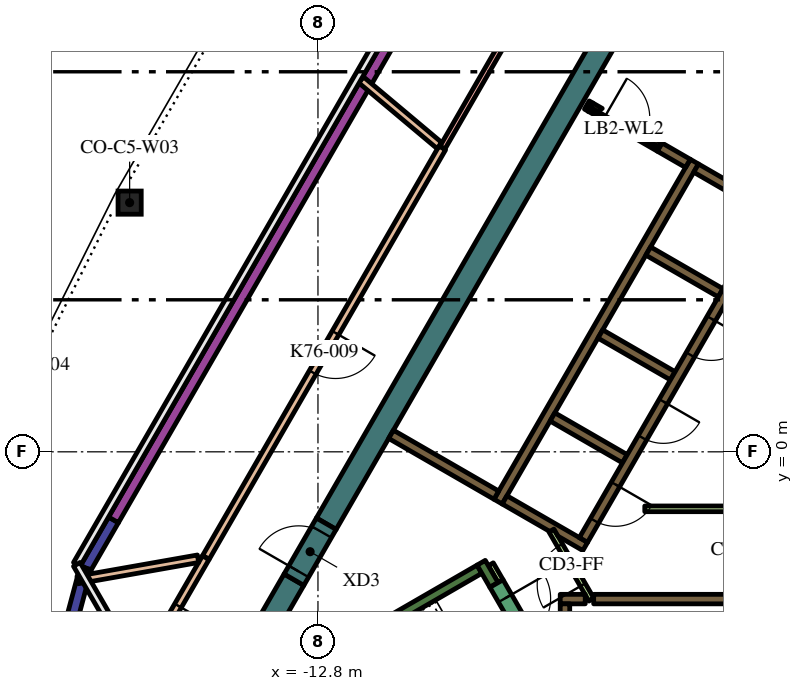
"""IFC4 building model, lengths in metres.
Left out: names, types, materials, properties, quantities, classifications, styles, units other than length and angle.
Written with IfcOpenShell. Run it as: python <this file> out.ifc"""

import sys

from ifc_helpers import new_model, si_unit, direction, frame, frame_2d, origin, origin_2d, place, context, subcontext, project, spatial, polyline, rectangle, hollow_circle, outline, extrude, element, fill, save


model = new_model("IFC4")
c1 = context("Model", 3, precision=1e-05, world=origin(), true_north=direction((0.0, 1.0)))
c2 = subcontext(c1, "Body", "Model", "MODEL_VIEW")
j1 = project(units=[si_unit("LENGTHUNIT", "METRE"), si_unit("PLANEANGLEUNIT", "RADIAN")], contexts=[c1])
p1 = place(None, origin())
s1 = spatial("IfcSite", under=j1, at=p1, CompositionType="ELEMENT")
p2 = place(p1, origin())
s2 = spatial("IfcBuilding", under=s1, at=p2, CompositionType="ELEMENT")
p3 = place(p2, frame((0.0, 0.0, 327.6)))
s3 = spatial("IfcBuildingStorey", under=s2, at=p3, CompositionType="ELEMENT", Elevation=327.6)
p4 = place(p3, frame((-17.756, 6.557, 0.0), z_axis=(0.0, 0.0, 1.0), x_axis=(1.0, 0.0, 0.0)))
e1 = element("IfcColumn", 1, at=p4, inside=s3, PredefinedType="COLUMN", context=c2, shape_type="SweptSolid", body=[
    extrude(hollow_circle(Radius=0.305, WallThickness=0.025, at=origin_2d()), origin(), (0.0, 0.0, 1.0), 4.2),
])
p5 = place(p3, frame((-13.432, -3.364, 0.0), z_axis=(0.0, 0.0, 1.0), x_axis=(-0.499960127962, -0.866048422692, 0.0)))
e2 = element("IfcWall", 2, at=p5, inside=s3, PredefinedType="SOLIDWALL", context=c2, shape_type="SweptSolid", body=[
    extrude(rectangle(XDim=2.934, YDim=0.6, at=frame_2d((1.467, 0.0))), origin(), (0.0, 0.0, 1.0), 4.2),
])
p6 = place(p3, frame((-4.652, 11.842, 0.0), z_axis=(0.0, 0.0, 1.0), x_axis=(-0.500003640647, -0.866023301845, 0.0)))
e3 = element("IfcWall", 3, at=p6, inside=s3, PredefinedType="SOLIDWALL", context=c2, shape_type="SweptSolid", body=[
    extrude(rectangle(XDim=15.858, YDim=0.6, at=frame_2d((7.929, 0.0))), origin(), (0.0, 0.0, 1.0), 4.2),
])
p7 = place(p3, frame((-14.44, -6.49, 0.0), z_axis=(0.0, 0.0, 1.0), x_axis=(0.866022966069, 0.500004222222, 0.0)))
e4 = element("IfcWall", 4, at=p7, inside=s3, PredefinedType="SOLIDWALL", context=c2, shape_type="SweptSolid", body=[
    extrude(rectangle(XDim=6.8, YDim=0.25, at=frame_2d((3.4, 0.0))), origin(), (0.0, 0.0, 1.0), 4.2),
])
p8 = place(p3, frame((-8.168, -3.503, 0.0), z_axis=(0.0, 0.0, 1.0), x_axis=(-0.499952099219, 0.866053057547, 0.0)))
e5 = element("IfcWall", 5, at=p8, inside=s3, PredefinedType="SOLIDWALL", context=c2, shape_type="SweptSolid", body=[
    extrude(rectangle(XDim=0.675, YDim=0.25, at=frame_2d((0.337, 0.0))), origin(), (0.0, 0.0, 1.0), 4.2),
])
p9 = place(p3, frame((-5.545, -3.875, 0.0), z_axis=(0.0, 0.0, 1.0), x_axis=(1.0, 0.0, 0.0)))
e6 = element("IfcWall", 6, at=p9, inside=s3, PredefinedType="SOLIDWALL", context=c2, shape_type="SweptSolid", body=[
    extrude(rectangle(XDim=11.97, YDim=0.25, at=frame_2d((5.985, 0.0))), origin(), (0.0, 0.0, 1.0), 4.2),
])
p10 = place(p3, frame((-6.425, -3.875, 0.0), z_axis=(0.0, 0.0, 1.0), x_axis=(1.0, 0.0, 0.0)))
e7 = element("IfcWall", 7, at=p10, inside=s3, PredefinedType="SOLIDWALL", context=c2, shape_type="SweptSolid", body=[
    extrude(rectangle(XDim=0.658, YDim=0.25, at=frame_2d((0.329, 0.0))), origin(), (0.0, 0.0, 1.0), 4.2),
])
p11 = place(p3, frame((-6.3, -7.125, 0.0), z_axis=(0.0, 0.0, 1.0), x_axis=(0.0, 1.0, 0.0)))
e8 = element("IfcWall", 8, at=p11, inside=s3, PredefinedType="SOLIDWALL", context=c2, shape_type="SweptSolid", body=[
    extrude(rectangle(XDim=3.125, YDim=0.25, at=frame_2d((1.562, 0.0))), origin(), (0.0, 0.0, 1.0), 4.2),
])
p12 = place(p3, frame((-8.06, -1.311, 0.0), z_axis=(0.0, 0.0, 1.0), x_axis=(0.50000273126, 0.866023826885, 0.0)))
e9 = element("IfcWall", 9, at=p12, inside=s3, PredefinedType="SOLIDWALL", context=c2, shape_type="SweptSolid", body=[
    extrude(rectangle(XDim=10.33, YDim=0.25, at=frame_2d((5.165, 0.0))), origin(), (0.0, 0.0, 1.0), 4.2),
])
p13 = place(p3, frame((-1.76, 6.836, 0.0), z_axis=(0.0, 0.0, 1.0), x_axis=(-0.865952863304, 0.500125622755, 0.0)))
e10 = element("IfcWall", 10, at=p13, inside=s3, PredefinedType="SOLIDWALL", context=c2, shape_type="SweptSolid", body=[
    extrude(rectangle(XDim=1.258, YDim=0.25, at=frame_2d((0.629, 0.0))), origin(), (0.0, 0.0, 1.0), 4.2),
])
for number, where, z_axis, x_axis in (
    (11, (-2.204, 4.182, 0.0), (0.0, 0.0, 1.0), (-0.866, 0.5, 0.0)),
    (12, (-5.369, 3.1, 0.0), (0.0, 0.0, 1.0), (0.866, -0.5, 0.0)),
    (13, (-4.724, -0.182, 0.0), (0.0, 0.0, 1.0), (-0.866, 0.5, 0.0)),
):
    element("IfcWall", number, at=place(p3, frame(where, z_axis=z_axis, x_axis=x_axis)), inside=s3, PredefinedType="SOLIDWALL", context=c2, shape_type="SweptSolid", body=[
        extrude(rectangle(XDim=2.2, YDim=0.25, at=frame_2d((1.1, 0.0))), origin(), (0.0, 0.0, 1.0), 4.2),
    ])
p14 = place(p3, origin())
e14 = element("IfcWall", 14, at=p14, inside=s3, PredefinedType="SOLIDWALL", context=c2, shape_type="SweptSolid", body=[
    extrude(outline(polyline([(-5.922, -2.257), (-5.922, -2.257), (-5.705, -2.382), (-5.83, -2.598), (-6.483, -2.221), (-6.591, -2.033), (-6.591, -2.033), (-6.7, -2.096), (-7.952, -1.373), (-7.827, -1.156), (-5.922, -2.257)])), origin(), (0.0, 0.0, 1.0), 4.2),
])
p15 = place(p3, frame((-8.106, -1.14, 0.0), z_axis=(0.0, 0.0, 1.0), x_axis=(-0.866008981251, 0.500028443584, 0.0)))
e15 = element("IfcWall", 15, at=p15, inside=s3, PredefinedType="SOLIDWALL", context=c2, shape_type="SweptSolid", body=[
    extrude(rectangle(XDim=3.2, YDim=0.25, at=frame_2d((1.6, 0.0))), origin(), (0.0, 0.0, 1.0), 4.2),
])
p16 = place(p3, frame((-5.725, 9.125, 0.0), z_axis=(0.0, 0.0, 1.0), x_axis=(0.866185586049, -0.49972245349, 0.0)))
e16 = element("IfcWall", 16, at=p16, inside=s3, PredefinedType="SOLIDWALL", context=c2, shape_type="SweptSolid", body=[
    extrude(rectangle(XDim=0.11, YDim=0.25, at=frame_2d((0.055, 0.0))), origin(), (0.0, 0.0, 1.0), 4.2),
])
p17 = place(p3, frame((-3.066, 7.59, 0.0), z_axis=(0.0, 0.0, 1.0), x_axis=(-0.866081358704, 0.49990307071, 0.0)))
e17 = element("IfcWall", 17, at=p17, inside=s3, PredefinedType="SOLIDWALL", context=c2, shape_type="SweptSolid", body=[
    extrude(rectangle(XDim=0.858, YDim=0.25, at=frame_2d((0.429, 0.0))), origin(), (0.0, 0.0, 1.0), 4.2),
])
e18 = element("IfcWall", 18, at=p14, inside=s3, PredefinedType="SOLIDWALL", context=c2, shape_type="SweptSolid", body=[
    extrude(outline(polyline([(-3.748, 8.128), (-3.813, 8.015), (-4.027, 8.139), (-4.017, 8.156), (-4.008, 8.173), (-4.0, 8.192), (-3.995, 8.21), (-3.991, 8.23), (-3.99, 8.25), (-3.99, 8.268), (-3.748, 8.128)])), origin(), (0.0, 0.0, 1.0), 4.2),
])
e19 = element("IfcWall", 19, at=p14, inside=s3, PredefinedType="SOLIDWALL", context=c2, shape_type="SweptSolid", body=[
    extrude(outline(polyline([(-5.689, 8.96), (-5.69, 8.961), (-5.565, 9.177), (-5.319, 9.035), (-5.335, 9.026), (-5.351, 9.015), (-5.366, 9.002), (-5.379, 8.988), (-5.392, 8.972), (-5.402, 8.956), (-5.412, 8.939), (-5.629, 9.064), (-5.629, 9.064), (-5.689, 8.96)])), origin(), (0.0, 0.0, 1.0), 4.2),
])
p18 = place(p3, frame((-8.252, -2.958, 0.0), z_axis=(0.0, 0.0, 1.0), x_axis=(0.500174715838, -0.865924508047, 0.0)))
e20 = element("IfcWall", 20, at=p18, inside=s3, PredefinedType="PARTITIONING", context=c2, shape_type="SweptSolid", body=[
    extrude(rectangle(XDim=0.514, YDim=0.15, at=frame_2d((0.257, 0.0))), origin(), (0.0, 0.0, 1.0), 3.45),
])
p19 = place(p3, frame((-4.2, -1.5, 0.0), z_axis=(0.0, 0.0, 1.0), x_axis=(1.0, 0.0, 0.0)))
e21 = element("IfcWall", 21, at=p19, inside=s3, PredefinedType="PARTITIONING", context=c2, shape_type="SweptSolid", body=[
    extrude(rectangle(XDim=9.359, YDim=0.15, at=frame_2d((4.68, 0.0))), origin(), (0.0, 0.0, 1.0), 3.45),
])
p20 = place(p3, frame((-0.898, 6.194, 0.0), z_axis=(0.0, 0.0, 1.0), x_axis=(-0.499996202215, -0.866027596426, 0.0)))
e22 = element("IfcWall", 22, at=p20, inside=s3, PredefinedType="SOLIDWALL", context=c2, shape_type="SweptSolid", body=[
    extrude(rectangle(XDim=9.83, YDim=0.25, at=frame_2d((4.915, 0.0))), origin(), (0.0, 0.0, 1.0), 4.2),
])
p21 = place(p20, frame((0.585, 0.0, 0.0)))
e23 = element("IfcOpeningElement", 23, at=p21, cuts=e22, PredefinedType="OPENING", context=c2, shape_type="SweptSolid", body=[
    extrude(rectangle(XDim=1.1, YDim=2.1, at=frame_2d((0.55, 1.05))), frame((0.0, 0.135, 0.0), z_axis=(0.0, -1.0, 0.0), x_axis=(1.0, 0.0, 0.0)), (0.0, 0.0, 1.0), 0.27),
])
p22 = place(p20, frame((3.105, 0.0, 0.0)))
e24 = element("IfcOpeningElement", 24, at=p22, cuts=e22, PredefinedType="OPENING", context=c2, shape_type="SweptSolid", body=[
    extrude(rectangle(XDim=1.1, YDim=2.1, at=frame_2d((0.55, 1.05))), frame((0.0, 0.135, 0.0), z_axis=(0.0, -1.0, 0.0), x_axis=(1.0, 0.0, 0.0)), (0.0, 0.0, 1.0), 0.27),
])
p23 = place(p20, frame((5.625, 0.0, 0.0)))
e25 = element("IfcOpeningElement", 25, at=p23, cuts=e22, PredefinedType="OPENING", context=c2, shape_type="SweptSolid", body=[
    extrude(rectangle(XDim=1.1, YDim=2.1, at=frame_2d((0.55, 1.05))), frame((0.0, 0.135, 0.0), z_axis=(0.0, -1.0, 0.0), x_axis=(1.0, 0.0, 0.0)), (0.0, 0.0, 1.0), 0.27),
])
p24 = place(p20, frame((8.145, 0.0, 0.0)))
e26 = element("IfcOpeningElement", 26, at=p24, cuts=e22, PredefinedType="OPENING", context=c2, shape_type="SweptSolid", body=[
    extrude(rectangle(XDim=1.1, YDim=2.1, at=frame_2d((0.55, 1.05))), frame((0.0, 0.135, 0.0), z_axis=(0.0, -1.0, 0.0), x_axis=(1.0, 0.0, 0.0)), (0.0, 0.0, 1.0), 0.27),
])
p25 = place(p3, frame((-8.103, -3.466, 0.0), z_axis=(0.0, 0.0, 1.0), x_axis=(0.500078061341, -0.865980330357, 0.0)))
e27 = element("IfcWall", 27, at=p25, inside=s3, PredefinedType="SOLIDWALL", context=c2, shape_type="SweptSolid", body=[
    extrude(rectangle(XDim=2.1, YDim=0.4, at=frame_2d((1.05, 0.0))), origin(), (0.0, 0.0, 1.0), 4.2),
])
p26 = place(p25, frame((0.45, 0.0, 0.0)))
e28 = element("IfcOpeningElement", 28, at=p26, cuts=e27, PredefinedType="OPENING", context=c2, shape_type="SweptSolid", body=[
    extrude(rectangle(XDim=1.2, YDim=2.1, at=frame_2d((0.6, 1.05))), frame((0.0, 0.21, 0.0), z_axis=(0.0, -1.0, 0.0), x_axis=(1.0, 0.0, 0.0)), (0.0, 0.0, 1.0), 0.42),
])
p27 = place(p3, frame((-5.606, -3.89, 0.0), z_axis=(0.0, 0.0, 1.0), x_axis=(-0.500027713859, 0.866009402589, 0.0)))
e29 = element("IfcWall", 29, at=p27, inside=s3, PredefinedType="PARTITIONING", context=c2, shape_type="SweptSolid", body=[
    extrude(rectangle(XDim=2.1, YDim=0.15, at=frame_2d((1.05, 0.0))), origin(), (0.0, 0.0, 1.0), 3.45),
])
p28 = place(p27, frame((0.45, 0.0, 0.0)))
e30 = element("IfcOpeningElement", 30, at=p28, cuts=e29, PredefinedType="OPENING", context=c2, shape_type="SweptSolid", body=[
    extrude(rectangle(XDim=1.2, YDim=2.1, at=frame_2d((0.6, 1.05))), frame((0.0, 0.085, 0.0), z_axis=(0.0, -1.0, 0.0), x_axis=(1.0, 0.0, 0.0)), (0.0, 0.0, 1.0), 0.17),
])
p29 = place(p3, frame((-5.659, 9.012, 0.0), z_axis=(0.0, 0.0, 1.0), x_axis=(0.866009402589, -0.500027713859, 0.0)))
e31 = element("IfcWall", 31, at=p29, inside=s3, PredefinedType="PARTITIONING", context=c2, shape_type="SweptSolid", body=[
    extrude(rectangle(XDim=2.1, YDim=0.12, at=frame_2d((1.05, 0.0))), origin(), (0.0, 0.0, 1.0), 3.45),
])
p30 = place(p29, frame((0.45, 0.0, 0.0)))
e32 = element("IfcOpeningElement", 32, at=p30, cuts=e31, PredefinedType="OPENING", context=c2, shape_type="SweptSolid", body=[
    extrude(rectangle(XDim=1.2, YDim=2.1, at=frame_2d((0.6, 1.05))), frame((0.0, 0.07, 0.0), z_axis=(0.0, -1.0, 0.0), x_axis=(1.0, 0.0, 0.0)), (0.0, 0.0, 1.0), 0.14),
])
p31 = place(p3, frame((-13.432, -3.364, 0.0), z_axis=(0.0, 0.0, 1.0), x_axis=(0.500000056704, 0.866025371046, 0.0)))
e33 = element("IfcWall", 33, at=p31, inside=s3, PredefinedType="SOLIDWALL", context=c2, shape_type="SweptSolid", body=[
    extrude(rectangle(XDim=1.7, YDim=0.6, at=frame_2d((0.85, 0.0))), origin(), (0.0, 0.0, 1.0), 4.2),
])
p32 = place(p31, frame((0.25, 0.0, 0.0)))
e34 = element("IfcOpeningElement", 34, at=p32, cuts=e33, PredefinedType="OPENING", context=c2, shape_type="SweptSolid", body=[
    extrude(rectangle(XDim=1.2, YDim=2.1, at=frame_2d((0.6, 1.05))), frame((0.0, 0.31, 0.0), z_axis=(0.0, -1.0, 0.0), x_axis=(1.0, 0.0, 0.0)), (0.0, 0.0, 1.0), 0.62),
])
p33 = place(p3, frame((-9.529, 7.996, 0.0), z_axis=(0.0, 0.0, 1.0), x_axis=(-0.499982954681, -0.866035244681, 0.0)))
e35 = element("IfcWall", 35, at=p33, inside=s3, PredefinedType="PARTITIONING", context=c2, shape_type="SweptSolid", body=[
    extrude(rectangle(XDim=12.439, YDim=0.2, at=frame_2d((6.22, 0.0))), origin(), (0.0, 0.0, 1.0), 3.45),
])
p34 = place(p33, frame((5.62, 0.0, 0.0)))
e36 = element("IfcOpeningElement", 36, at=p34, cuts=e35, PredefinedType="OPENING", context=c2, shape_type="SweptSolid", body=[
    extrude(rectangle(XDim=1.2, YDim=2.1, at=frame_2d((0.6, 1.05))), frame((0.0, 0.11, 0.0), z_axis=(0.0, -1.0, 0.0), x_axis=(1.0, 0.0, 0.0)), (0.0, 0.0, 1.0), 0.22),
])
p35 = place(p3, frame((-3.406, 18.6, 0.0), z_axis=(0.0, 0.0, 1.0), x_axis=(-0.499991334387, -0.866030406821, 0.0)))
e37 = element("IfcWall", 37, at=p35, inside=s3, PredefinedType="PARTITIONING", context=c2, shape_type="SweptSolid", body=[
    extrude(rectangle(XDim=12.235, YDim=0.15, at=frame_2d((6.118, 0.0))), origin(), (0.0, 0.0, 1.0), 3.45),
])
p36 = place(p35, frame((5.617, 0.0, 0.0)))
e38 = element("IfcOpeningElement", 38, at=p36, cuts=e37, PredefinedType="OPENING", context=c2, shape_type="SweptSolid", body=[
    extrude(rectangle(XDim=1.0, YDim=2.1, at=frame_2d((0.5, 1.05))), frame((0.0, 0.085, 0.0), z_axis=(0.0, -1.0, 0.0), x_axis=(1.0, 0.0, 0.0)), (0.0, 0.0, 1.0), 0.17),
])
p37 = place(p3, frame((-15.753, -2.785, 0.0), z_axis=(0.0, 0.0, 1.0), x_axis=(-0.500004836318, -0.866022611517, 0.0)))
e39 = element("IfcWall", 39, at=p37, inside=s3, PredefinedType="PARTITIONING", context=c2, shape_type="SweptSolid", body=[
    extrude(rectangle(XDim=4.116, YDim=0.2, at=frame_2d((2.058, 0.0))), origin(), (0.0, 0.0, 1.0), 3.45),
])
p38 = place(p37, frame((1.458, 0.0, 0.0)))
e40 = element("IfcOpeningElement", 40, at=p38, cuts=e39, PredefinedType="OPENING", context=c2, shape_type="SweptSolid", body=[
    extrude(rectangle(XDim=1.2, YDim=2.1, at=frame_2d((0.6, 1.05))), frame((0.0, 0.11, 0.0), z_axis=(0.0, -1.0, 0.0), x_axis=(1.0, 0.0, 0.0)), (0.0, 0.0, 1.0), 0.22),
])
p39 = place(p3, frame((-19.123, -3.372, 0.0), z_axis=(0.0, 0.0, 1.0), x_axis=(0.984810286539, 0.173633808708, 0.0)))
e41 = element("IfcWall", 41, at=p39, inside=s3, PredefinedType="PARTITIONING", context=c2, shape_type="SweptSolid", body=[
    extrude(rectangle(XDim=3.217, YDim=0.2, at=frame_2d((1.608, 0.0))), origin(), (0.0, 0.0, 1.0), 3.45),
])
p40 = place(p3, frame((-9.605, 8.06, 0.0), z_axis=(0.0, 0.0, 1.0), x_axis=(-0.766005403392, 0.642834132552, 0.0)))
e42 = element("IfcWall", 42, at=p40, inside=s3, PredefinedType="PARTITIONING", context=c2, shape_type="SweptSolid", body=[
    extrude(rectangle(XDim=2.688, YDim=0.2, at=frame_2d((1.344, 0.0))), origin(), (0.0, 0.0, 1.0), 3.45),
])
p41 = place(p3, frame((-7.54, 16.64, 0.0), z_axis=(0.0, 0.0, 1.0), x_axis=(-0.500002158106, -0.866024157798, 0.0)))
e43 = element("IfcWall", 43, at=p41, inside=s3, PredefinedType="SOLIDWALL", context=c2, shape_type="SweptSolid", body=[
    extrude(rectangle(XDim=21.282, YDim=0.3, at=frame_2d((10.641, 0.0))), origin(), (0.0, 0.0, 1.0), 3.45),
])
p42 = place(p3, frame((-18.181, -1.79, 0.0), z_axis=(0.0, 0.0, 1.0), x_axis=(-0.500049712553, -0.865996700326, 0.0)))
e44 = element("IfcWall", 44, at=p42, inside=s3, PredefinedType="SOLIDWALL", context=c2, shape_type="SweptSolid", body=[
    extrude(rectangle(XDim=1.464, YDim=0.3, at=frame_2d((0.732, 0.0))), origin(), (0.0, 0.0, 1.0), 3.95),
])
p43 = place(p3, frame((-18.913, -3.058, 0.0), z_axis=(0.0, 0.0, 1.0), x_axis=(-0.258824282894, -0.965924422812, 0.0)))
e45 = element("IfcWall", 45, at=p43, inside=s3, PredefinedType="SOLIDWALL", context=c2, shape_type="SweptSolid", body=[
    extrude(rectangle(XDim=1.753, YDim=0.3, at=frame_2d((0.876, 0.0))), origin(), (0.0, 0.0, 1.0), 3.95),
])
p44 = place(p22, origin())
e46 = element("IfcDoor", 46, at=p44, inside=s3, OperationType="DOUBLE_DOOR_SLIDING", PredefinedType="DOOR", context=c2, shape_type="SweptSolid", body=[
    extrude(rectangle(XDim=1.1, YDim=2.1, at=frame_2d((0.55, 1.05))), frame((0.0, 0.025, 0.0), z_axis=(0.0, -1.0, 0.0), x_axis=(1.0, 0.0, 0.0)), (0.0, 0.0, 1.0), 0.05),
])
fill(e24, e46)
p45 = place(p23, origin())
e47 = element("IfcDoor", 47, at=p45, inside=s3, OperationType="DOUBLE_DOOR_SLIDING", PredefinedType="DOOR", context=c2, shape_type="SweptSolid", body=[
    extrude(rectangle(XDim=1.1, YDim=2.1, at=frame_2d((0.55, 1.05))), frame((0.0, 0.025, 0.0), z_axis=(0.0, -1.0, 0.0), x_axis=(1.0, 0.0, 0.0)), (0.0, 0.0, 1.0), 0.05),
])
fill(e25, e47)
p46 = place(p24, origin())
e48 = element("IfcDoor", 48, at=p46, inside=s3, OperationType="DOUBLE_DOOR_SLIDING", PredefinedType="DOOR", context=c2, shape_type="SweptSolid", body=[
    extrude(rectangle(XDim=1.1, YDim=2.1, at=frame_2d((0.55, 1.05))), frame((0.0, 0.025, 0.0), z_axis=(0.0, -1.0, 0.0), x_axis=(1.0, 0.0, 0.0)), (0.0, 0.0, 1.0), 0.05),
])
fill(e26, e48)
p47 = place(p26, origin())
e49 = element("IfcDoor", 49, at=p47, inside=s3, OperationType="SINGLE_SWING_LEFT", PredefinedType="DOOR", context=c2, shape_type="SweptSolid", body=[
    extrude(rectangle(XDim=1.2, YDim=2.1, at=frame_2d((0.6, 1.05))), frame((0.0, 0.025, 0.0), z_axis=(0.0, -1.0, 0.0), x_axis=(1.0, 0.0, 0.0)), (0.0, 0.0, 1.0), 0.05),
])
fill(e28, e49)
p48 = place(p28, origin())
e50 = element("IfcDoor", 50, at=p48, inside=s3, OperationType="SINGLE_SWING_LEFT", PredefinedType="DOOR", context=c2, shape_type="SweptSolid", body=[
    extrude(rectangle(XDim=1.2, YDim=2.1, at=frame_2d((0.6, 1.05))), frame((0.0, 0.025, 0.0), z_axis=(0.0, -1.0, 0.0), x_axis=(1.0, 0.0, 0.0)), (0.0, 0.0, 1.0), 0.05),
])
fill(e30, e50)
p49 = place(p30, origin())
e51 = element("IfcDoor", 51, at=p49, inside=s3, OperationType="SINGLE_SWING_LEFT", PredefinedType="DOOR", context=c2, shape_type="SweptSolid", body=[
    extrude(rectangle(XDim=1.2, YDim=2.1, at=frame_2d((0.6, 1.05))), frame((0.0, 0.025, 0.0), z_axis=(0.0, -1.0, 0.0), x_axis=(1.0, 0.0, 0.0)), (0.0, 0.0, 1.0), 0.05),
])
fill(e32, e51)
p50 = place(p32, origin())
e52 = element("IfcDoor", 52, at=p50, inside=s3, OperationType="SINGLE_SWING_LEFT", PredefinedType="DOOR", context=c2, shape_type="SweptSolid", body=[
    extrude(rectangle(XDim=1.2, YDim=2.1, at=frame_2d((0.6, 1.05))), frame((0.0, 0.025, 0.0), z_axis=(0.0, -1.0, 0.0), x_axis=(1.0, 0.0, 0.0)), (0.0, 0.0, 1.0), 0.05),
])
fill(e34, e52)
p51 = place(p38, origin())
e53 = element("IfcDoor", 53, at=p51, inside=s3, OperationType="SINGLE_SWING_LEFT", PredefinedType="DOOR", context=c2, shape_type="SweptSolid", body=[
    extrude(rectangle(XDim=1.2, YDim=2.1, at=frame_2d((0.6, 1.05))), frame((0.0, 0.025, 0.0), z_axis=(0.0, -1.0, 0.0), x_axis=(1.0, 0.0, 0.0)), (0.0, 0.0, 1.0), 0.05),
])
fill(e40, e53)
p52 = place(p34, origin())
e54 = element("IfcDoor", 54, at=p52, inside=s3, OperationType="SINGLE_SWING_RIGHT", PredefinedType="DOOR", context=c2, shape_type="SweptSolid", body=[
    extrude(rectangle(XDim=1.2, YDim=2.1, at=frame_2d((0.6, 1.05))), frame((0.0, 0.025, 0.0), z_axis=(0.0, -1.0, 0.0), x_axis=(1.0, 0.0, 0.0)), (0.0, 0.0, 1.0), 0.05),
])
fill(e36, e54)
save(model, sys.argv[1])
